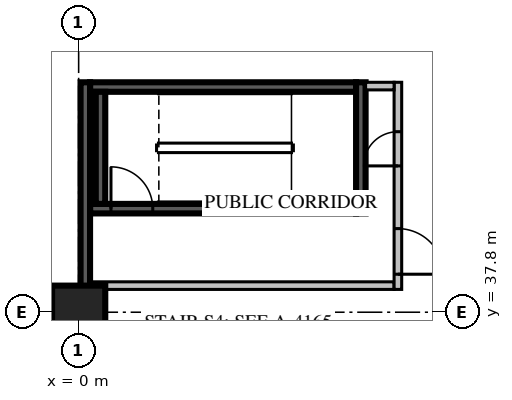
"""IFC4 building model, lengths in metres.
Left out: names, types, materials, properties, quantities, classifications, styles, units other than length and angle.
Written with IfcOpenShell. Run it as: python <this file> out.ifc"""

import sys

from ifc_helpers import new_model, si_unit, direction, frame, frame_2d, origin, origin_2d, place, context, subcontext, project, spatial, rectangle, extrude, source, transform, mapped, element, fill, save


model = new_model("IFC4")
c1 = context("Model", 3, precision=1e-05, world=origin(), true_north=direction((0.0, 1.0)))
c2 = subcontext(c1, "Body", "Model", "MODEL_VIEW")
j1 = project(units=[si_unit("LENGTHUNIT", "METRE"), si_unit("PLANEANGLEUNIT", "RADIAN")], contexts=[c1])
p1 = place(None, origin())
s1 = spatial("IfcSite", under=j1, at=p1, CompositionType="ELEMENT")
p2 = place(p1, origin())
s2 = spatial("IfcBuilding", under=s1, at=p2, CompositionType="ELEMENT")
p3 = place(p2, frame((0.0, 0.0, 23.7)))
s3 = spatial("IfcBuildingStorey", under=s2, at=p3, CompositionType="ELEMENT", Elevation=23.7)
m1 = source(origin(), c2, "Body", "SweptSolid", [
    extrude(rectangle(XDim=1.4, YDim=1.4, at=origin_2d()), origin(), (0.0, 0.0, 1.0), 5.4),
])
p4 = place(p3, frame((0.0, 37.8, 0.0), z_axis=(0.0, 0.0, 1.0), x_axis=(1.0, 0.0, 0.0)))
e1 = element("IfcColumn", 1, at=p4, inside=s3, PredefinedType="COLUMN", context=c2, shape_type="MappedRepresentation", body=[
    mapped(m1, transform((0.0, 0.0, 0.0), scale=1.0)),
])
m2 = source(origin(), c2, "Body", "SweptSolid", [
    extrude(rectangle(XDim=7.0, YDim=0.25, at=frame_2d((3.5, 0.0))), origin(), (0.0, 0.0, 1.0), 4.8),
])
p5 = place(p3, frame((0.3, 40.525, 0.0), z_axis=(0.0, 0.0, 1.0), x_axis=(1.0, 0.0, 0.0)))
e2 = element("IfcWall", 2, at=p5, inside=s3, PredefinedType="SOLIDWALL", context=c2, shape_type="MappedRepresentation", body=[
    mapped(m2, transform((0.0, 0.0, 0.0), scale=1.0)),
])
m3 = source(origin(), c2, "Body", "SweptSolid", [
    extrude(rectangle(XDim=1.1, YDim=2.1, at=frame_2d((0.55, 1.05))), frame((0.0, 0.135, 0.0), z_axis=(0.0, -1.0, 0.0), x_axis=(1.0, 0.0, 0.0)), (0.0, 0.0, 1.0), 0.27),
])
p6 = place(p5, frame((0.55, 0.0, 0.0)))
e3 = element("IfcOpeningElement", 3, at=p6, cuts=e2, PredefinedType="OPENING", context=c2, shape_type="MappedRepresentation", body=[
    mapped(m3, transform((0.0, 0.0, 0.0), scale=1.0)),
])
p7 = place(p3, frame((0.3, 43.725, 0.0), z_axis=(0.0, 0.0, 1.0), x_axis=(1.0, 0.0, 0.0)))
e4 = element("IfcWall", 4, at=p7, inside=s3, PredefinedType="SOLIDWALL", context=c2, shape_type="MappedRepresentation", body=[
    mapped(m2, transform((0.0, 0.0, 0.0), scale=1.0)),
])
m4 = source(origin(), c2, "Body", "SweptSolid", [
    extrude(rectangle(XDim=3.45, YDim=0.25, at=frame_2d((1.725, 0.0))), origin(), (0.0, 0.0, 1.0), 4.8),
])
p8 = place(p3, frame((7.425, 40.4, 0.0), z_axis=(0.0, 0.0, 1.0), x_axis=(0.0, 1.0, 0.0)))
e5 = element("IfcWall", 5, at=p8, inside=s3, PredefinedType="SOLIDWALL", context=c2, shape_type="MappedRepresentation", body=[
    mapped(m4, transform((0.0, 0.0, 0.0), scale=1.0)),
])
m5 = source(origin(), c2, "Body", "SweptSolid", [
    extrude(rectangle(XDim=2.95, YDim=0.25, at=frame_2d((1.475, 0.0))), origin(), (0.0, 0.0, 1.0), 4.8),
])
p9 = place(p3, frame((0.575, 40.65, 0.0), z_axis=(0.0, 0.0, 1.0), x_axis=(0.0, 1.0, 0.0)))
e6 = element("IfcWall", 6, at=p9, inside=s3, PredefinedType="SOLIDWALL", context=c2, shape_type="MappedRepresentation", body=[
    mapped(m5, transform((0.0, 0.0, 0.0), scale=1.0)),
])
m6 = source(origin(), c2, "Body", "SweptSolid", [
    extrude(rectangle(XDim=8.0, YDim=0.2, at=frame_2d((4.0, 0.0))), origin(), (0.0, 0.0, 1.0), 4.8),
])
p10 = place(p3, frame((0.3, 38.5, 0.0), z_axis=(0.0, 0.0, 1.0), x_axis=(1.0, 0.0, 0.0)))
e7 = element("IfcWall", 7, at=p10, inside=s3, PredefinedType="PARTITIONING", context=c2, shape_type="MappedRepresentation", body=[
    mapped(m6, transform((0.0, 0.0, 0.0), scale=1.0)),
])
m7 = source(origin(), c2, "Body", "SweptSolid", [
    extrude(rectangle(XDim=5.45, YDim=0.2, at=frame_2d((2.725, 0.0))), origin(), (0.0, 0.0, 1.0), 4.8),
])
p11 = place(p3, frame((8.4, 38.4, 0.0), z_axis=(0.0, 0.0, 1.0), x_axis=(0.0, 1.0, 0.0)))
e8 = element("IfcWall", 8, at=p11, inside=s3, PredefinedType="PARTITIONING", context=c2, shape_type="MappedRepresentation", body=[
    mapped(m7, transform((0.0, 0.0, 0.0), scale=1.0)),
])
m8 = source(origin(), c2, "Body", "SweptSolid", [
    extrude(rectangle(XDim=1.2, YDim=2.1, at=frame_2d((0.6, 1.05))), frame((0.0, 0.11, 0.0), z_axis=(0.0, -1.0, 0.0), x_axis=(1.0, 0.0, 0.0)), (0.0, 0.0, 1.0), 0.22),
])
p12 = place(p11, frame((0.4, 0.0, 0.0)))
e9 = element("IfcOpeningElement", 9, at=p12, cuts=e8, PredefinedType="OPENING", context=c2, shape_type="MappedRepresentation", body=[
    mapped(m8, transform((0.0, 0.0, 0.0), scale=1.0)),
])
m9 = source(origin(), c2, "Body", "SweptSolid", [
    extrude(rectangle(XDim=0.9, YDim=2.1, at=frame_2d((0.45, 1.05))), frame((0.0, 0.11, 0.0), z_axis=(0.0, -1.0, 0.0), x_axis=(1.0, 0.0, 0.0)), (0.0, 0.0, 1.0), 0.22),
])
p13 = place(p11, frame((3.25, 0.0, 0.0)))
e10 = element("IfcOpeningElement", 10, at=p13, cuts=e8, PredefinedType="OPENING", context=c2, shape_type="MappedRepresentation", body=[
    mapped(m9, transform((0.0, 0.0, 0.0), scale=1.0)),
])
m10 = source(origin(), c2, "Body", "SweptSolid", [
    extrude(rectangle(XDim=0.75, YDim=0.2, at=frame_2d((0.375, 0.0))), origin(), (0.0, 0.0, 1.0), 4.8),
])
p14 = place(p3, frame((7.55, 43.75, 0.0), z_axis=(0.0, 0.0, 1.0), x_axis=(1.0, 0.0, 0.0)))
e11 = element("IfcWall", 11, at=p14, inside=s3, PredefinedType="PARTITIONING", context=c2, shape_type="MappedRepresentation", body=[
    mapped(m10, transform((0.0, 0.0, 0.0), scale=1.0)),
])
m11 = source(origin(), c2, "Body", "SweptSolid", [
    extrude(rectangle(XDim=5.45, YDim=0.25, at=frame_2d((2.725, 0.0))), origin(), (0.0, 0.0, 1.0), 4.8),
])
p15 = place(p3, frame((0.175, 38.4, 0.0), z_axis=(0.0, 0.0, 1.0), x_axis=(0.0, 1.0, 0.0)))
e12 = element("IfcWall", 12, at=p15, inside=s3, PredefinedType="SOLIDWALL", context=c2, shape_type="MappedRepresentation", body=[
    mapped(m11, transform((0.0, 0.0, 0.0), scale=1.0)),
])
m12 = source(origin(), c2, "Body", "SweptSolid", [
    extrude(rectangle(XDim=1.1, YDim=2.1, at=frame_2d((0.55, 1.05))), frame((0.0, 0.025, 0.0), z_axis=(0.0, -1.0, 0.0), x_axis=(1.0, 0.0, 0.0)), (0.0, 0.0, 1.0), 0.05),
])
p16 = place(p6, origin())
e13 = element("IfcDoor", 13, at=p16, inside=s3, OperationType="SINGLE_SWING_LEFT", PredefinedType="DOOR", context=c2, shape_type="MappedRepresentation", body=[
    mapped(m12, transform((0.0, 0.0, 0.0), scale=1.0)),
])
fill(e3, e13)
m13 = source(origin(), c2, "Body", "SweptSolid", [
    extrude(rectangle(XDim=1.2, YDim=2.1, at=frame_2d((0.6, 1.05))), frame((0.0, 0.025, 0.0), z_axis=(0.0, -1.0, 0.0), x_axis=(1.0, 0.0, 0.0)), (0.0, 0.0, 1.0), 0.05),
])
p17 = place(p12, origin())
e14 = element("IfcDoor", 14, at=p17, inside=s3, OperationType="SINGLE_SWING_RIGHT", PredefinedType="DOOR", context=c2, shape_type="MappedRepresentation", body=[
    mapped(m13, transform((0.0, 0.0, 0.0), scale=1.0)),
])
fill(e9, e14)
m14 = source(origin(), c2, "Body", "SweptSolid", [
    extrude(rectangle(XDim=0.9, YDim=2.1, at=frame_2d((0.45, 1.05))), frame((0.0, 0.025, 0.0), z_axis=(0.0, -1.0, 0.0), x_axis=(1.0, 0.0, 0.0)), (0.0, 0.0, 1.0), 0.05),
])
p18 = place(p13, origin())
e15 = element("IfcDoor", 15, at=p18, inside=s3, OperationType="SINGLE_SWING_LEFT", PredefinedType="DOOR", context=c2, shape_type="MappedRepresentation", body=[
    mapped(m14, transform((0.0, 0.0, 0.0), scale=1.0)),
])
fill(e10, e15)
save(model, sys.argv[1])
